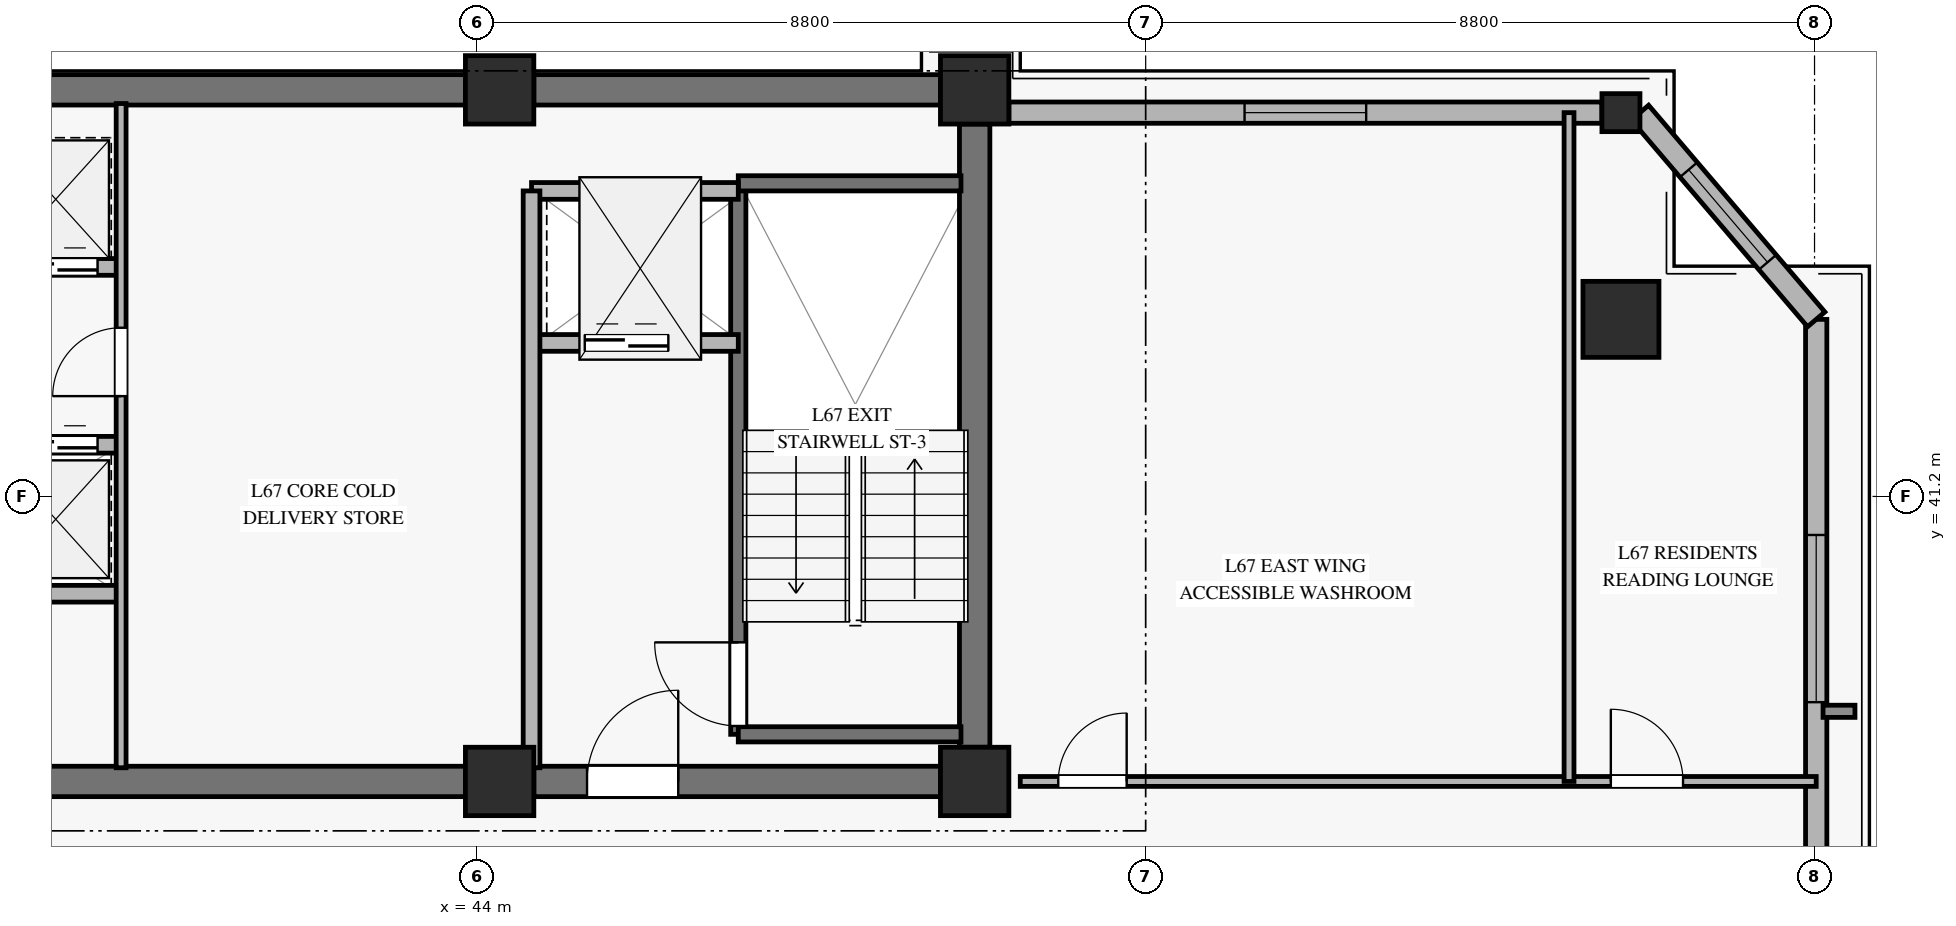
"""IFC4 building model, lengths in metres.
Left out: names, types, materials, properties, quantities, classifications, styles, units other than length and angle.
Written with IfcOpenShell. Run it as: python <this file> out.ifc"""

import sys

from ifc_helpers import new_model, si_unit, direction, frame, frame_2d, origin, origin_2d, place, context, subcontext, project, spatial, rectangle, hollow_rectangle, extrude, source, transform, mapped, element, fill, save


model = new_model("IFC4")
c1 = context("Model", 3, precision=1e-05, world=origin(), true_north=direction((0.0, 1.0)))
c2 = subcontext(c1, "Body", "Model", "MODEL_VIEW")
j1 = project(units=[si_unit("LENGTHUNIT", "METRE"), si_unit("PLANEANGLEUNIT", "RADIAN")], contexts=[c1])
p1 = place(None, origin())
s1 = spatial("IfcSite", under=j1, at=p1, CompositionType="ELEMENT")
p2 = place(p1, origin())
s2 = spatial("IfcBuilding", under=s1, at=p2, CompositionType="ELEMENT")
p3 = place(p2, frame((0.0, 0.0, 262.1)))
s3 = spatial("IfcBuildingStorey", under=s2, at=p3, CompositionType="ELEMENT", Elevation=262.1)
m1 = source(origin(), c2, "Body", "SweptSolid", [
    extrude(rectangle(XDim=0.9, YDim=0.9, at=origin_2d()), origin(), (0.0, 0.0, 1.0), 3.185),
])
for number, where, z_axis, x_axis in (
    (1, (44.3, 37.45, 0.0), (0.0, 0.0, 1.0), (1.0, 0.0, 0.0)),
    (2, (44.3, 46.55, 0.0), (0.0, 0.0, 1.0), (1.0, 0.0, 0.0)),
    (3, (50.55, 37.45, 0.0), (0.0, 0.0, 1.0), (1.0, 0.0, 0.0)),
    (4, (50.55, 46.55, 0.0), (0.0, 0.0, 1.0), (1.0, 0.0, 0.0)),
):
    element("IfcColumn", number, at=place(p3, frame(where, z_axis=z_axis, x_axis=x_axis)), inside=s3, PredefinedType="PILASTER", context=c2, shape_type="MappedRepresentation", body=[
        mapped(m1, transform((0.0, 0.0, 0.0), x_axis=(1.0, 0.0, 0.0), y_axis=(0.0, 1.0, 0.0), z_axis=(0.0, 0.0, 1.0), scale=1.0)),
    ])
p4 = place(p3, frame((36.05, 46.55, 0.0), z_axis=(0.0, 0.0, 1.0), x_axis=(1.0, 0.0, 0.0)))
e5 = element("IfcWall", 5, at=p4, inside=s3, PredefinedType="SHEAR", context=c2, shape_type="SweptSolid", body=[
    extrude(rectangle(XDim=7.8, YDim=0.4, at=frame_2d((3.9, 0.0))), origin(), (0.0, 0.0, 1.0), 3.185),
])
p5 = place(p3, frame((44.75, 46.55, 0.0), z_axis=(0.0, 0.0, 1.0), x_axis=(1.0, 0.0, 0.0)))
e6 = element("IfcWall", 6, at=p5, inside=s3, PredefinedType="SHEAR", context=c2, shape_type="SweptSolid", body=[
    extrude(rectangle(XDim=5.35, YDim=0.4, at=frame_2d((2.675, 0.0))), origin(), (0.0, 0.0, 1.0), 3.185),
])
p6 = place(p3, frame((36.05, 37.45, 0.0), z_axis=(0.0, 0.0, 1.0), x_axis=(1.0, 0.0, 0.0)))
e7 = element("IfcWall", 7, at=p6, inside=s3, PredefinedType="SHEAR", context=c2, shape_type="SweptSolid", body=[
    extrude(rectangle(XDim=7.8, YDim=0.4, at=frame_2d((3.9, 0.0))), origin(), (0.0, 0.0, 1.0), 3.185),
])
p7 = place(p3, frame((44.75, 37.45, 0.0), z_axis=(0.0, 0.0, 1.0), x_axis=(1.0, 0.0, 0.0)))
e8 = element("IfcWall", 8, at=p7, inside=s3, PredefinedType="SHEAR", context=c2, shape_type="SweptSolid", body=[
    extrude(rectangle(XDim=5.35, YDim=0.4, at=frame_2d((2.675, 0.0))), origin(), (0.0, 0.0, 1.0), 3.185),
])
p8 = place(p7, frame((0.7, 0.0, 0.0)))
e9 = element("IfcOpeningElement", 9, at=p8, cuts=e8, PredefinedType="OPENING", context=c2, shape_type="SweptSolid", body=[
    extrude(rectangle(XDim=1.2, YDim=2.15, at=frame_2d((0.6, 1.075))), frame((0.0, 0.21, 0.0), z_axis=(0.0, -1.0, 0.0), x_axis=(1.0, 0.0, 0.0)), (0.0, 0.0, 1.0), 0.42),
])
p9 = place(p3, frame((50.55, 37.9, 0.0), z_axis=(0.0, 0.0, 1.0), x_axis=(0.0, 1.0, 0.0)))
e10 = element("IfcWall", 10, at=p9, inside=s3, PredefinedType="SHEAR", context=c2, shape_type="SweptSolid", body=[
    extrude(rectangle(XDim=8.2, YDim=0.4, at=frame_2d((4.1, 0.0))), origin(), (0.0, 0.0, 1.0), 3.185),
])
m2 = source(origin(), c2, "Body", "SweptSolid", [
    extrude(hollow_rectangle(XDim=1.0, YDim=1.0, WallThickness=0.045, at=origin_2d()), origin(), (0.0, 0.0, 1.0), 3.185),
])
p10 = place(p3, frame((59.053, 43.53, 0.0), z_axis=(0.0, 0.0, 1.0), x_axis=(1.0, 0.0, 0.0)))
e11 = element("IfcColumn", 11, at=p10, inside=s3, PredefinedType="COLUMN", context=c2, shape_type="MappedRepresentation", body=[
    mapped(m2, transform((0.0, 0.0, 0.0), x_axis=(1.0, 0.0, 0.0), y_axis=(0.0, 1.0, 0.0), z_axis=(0.0, 0.0, 1.0), scale=1.0)),
])
m3 = source(origin(), c2, "Body", "SweptSolid", [
    extrude(hollow_rectangle(XDim=0.5, YDim=0.5, WallThickness=0.024, at=origin_2d()), origin(), (0.0, 0.0, 1.0), 3.185),
])
p11 = place(p3, frame((59.053, 46.25, 0.0), z_axis=(0.0, 0.0, 1.0), x_axis=(1.0, 0.0, 0.0)))
e12 = element("IfcColumn", 12, at=p11, inside=s3, PredefinedType="COLUMN", context=c2, shape_type="MappedRepresentation", body=[
    mapped(m3, transform((0.0, 0.0, 0.0), x_axis=(1.0, 0.0, 0.0), y_axis=(0.0, 1.0, 0.0), z_axis=(0.0, 0.0, 1.0), scale=1.0)),
])
p12 = place(p3, frame((61.622, 31.322, 0.0), z_axis=(0.0, 0.0, 1.0), x_axis=(0.0, 1.0, 0.0)))
e13 = element("IfcWall", 13, at=p12, inside=s3, PredefinedType="SOLIDWALL", context=c2, shape_type="SweptSolid", body=[
    extrude(rectangle(XDim=12.208, YDim=0.28, at=frame_2d((6.104, 0.0))), origin(), (0.0, 0.0, 1.0), 2.815),
])
p13 = place(p12, frame((7.171, 0.0, 0.45)))
e14 = element("IfcOpeningElement", 14, at=p13, cuts=e13, PredefinedType="OPENING", context=c2, shape_type="SweptSolid", body=[
    extrude(rectangle(XDim=2.2, YDim=2.1, at=frame_2d((1.1, 1.05))), frame((0.0, 0.15, 0.0), z_axis=(0.0, -1.0, 0.0), x_axis=(1.0, 0.0, 0.0)), (0.0, 0.0, 1.0), 0.3),
])
p14 = place(p3, frame((51.0, 46.25, 0.0), z_axis=(0.0, 0.0, 1.0), x_axis=(1.0, 0.0, 0.0)))
e15 = element("IfcWall", 15, at=p14, inside=s3, PredefinedType="SOLIDWALL", context=c2, shape_type="SweptSolid", body=[
    extrude(rectangle(XDim=7.803, YDim=0.28, at=frame_2d((3.901, 0.0))), origin(), (0.0, 0.0, 1.0), 2.815),
])
p15 = place(p14, frame((3.101, 0.0, 0.45)))
e16 = element("IfcOpeningElement", 16, at=p15, cuts=e15, PredefinedType="OPENING", context=c2, shape_type="SweptSolid", body=[
    extrude(rectangle(XDim=1.6, YDim=2.0, at=frame_2d((0.8, 1.0))), frame((0.0, 0.15, 0.0), z_axis=(0.0, -1.0, 0.0), x_axis=(1.0, 0.0, 0.0)), (0.0, 0.0, 1.0), 0.3),
])
p16 = place(p3, frame((61.622, 43.53, 0.0), z_axis=(0.0, 0.0, 1.0), x_axis=(-0.648803559951, 0.760955938669, 0.0)))
e17 = element("IfcWall", 17, at=p16, inside=s3, PredefinedType="SOLIDWALL", context=c2, shape_type="SweptSolid", body=[
    extrude(rectangle(XDim=3.574, YDim=0.3, at=frame_2d((1.787, 0.0))), origin(), (0.0, 0.0, 1.0), 2.815),
])
p17 = place(p16, frame((0.987, 0.0, 0.45)))
e18 = element("IfcOpeningElement", 18, at=p17, cuts=e17, PredefinedType="OPENING", context=c2, shape_type="SweptSolid", body=[
    extrude(rectangle(XDim=1.6, YDim=2.0, at=frame_2d((0.8, 1.0))), frame((0.0, 0.16, 0.0), z_axis=(0.0, -1.0, 0.0), x_axis=(1.0, 0.0, 0.0)), (0.0, 0.0, 1.0), 0.32),
])
p18 = place(p3, frame((47.44, 38.07, 0.0), z_axis=(0.0, 0.0, 1.0), x_axis=(0.0, 1.0, 0.0)))
e19 = element("IfcWall", 19, at=p18, inside=s3, PredefinedType="SOLIDWALL", context=c2, shape_type="SweptSolid", body=[
    extrude(rectangle(XDim=7.25, YDim=0.2, at=frame_2d((3.625, 0.0))), origin(), (0.0, 0.0, 1.0), 3.4),
])
p19 = place(p18, frame((0.11, 0.0, 0.0)))
e20 = element("IfcOpeningElement", 20, at=p19, cuts=e19, PredefinedType="OPENING", context=c2, shape_type="SweptSolid", body=[
    extrude(rectangle(XDim=1.1, YDim=2.15, at=frame_2d((0.55, 1.075))), frame((0.0, 0.11, 0.0), z_axis=(0.0, -1.0, 0.0), x_axis=(1.0, 0.0, 0.0)), (0.0, 0.0, 1.0), 0.22),
])
for number, where, z_axis, x_axis in (
    (21, (47.44, 45.32, 0.0), (0.0, 0.0, 1.0), (1.0, 0.0, 0.0)),
    (22, (47.44, 38.07, 0.0), (0.0, 0.0, 1.0), (1.0, 0.0, 0.0)),
):
    element("IfcWall", number, at=place(p3, frame(where, z_axis=z_axis, x_axis=x_axis)), inside=s3, PredefinedType="SOLIDWALL", context=c2, shape_type="SweptSolid", body=[
        extrude(rectangle(XDim=2.93, YDim=0.2, at=frame_2d((1.465, 0.0))), origin(), (0.0, 0.0, 1.0), 3.4),
    ])
p20 = place(p3, frame((44.72, 43.22, 0.0), z_axis=(0.0, 0.0, 1.0), x_axis=(1.0, 0.0, 0.0)))
e23 = element("IfcWall", 23, at=p20, inside=s3, PredefinedType="SOLIDWALL", context=c2, shape_type="SweptSolid", body=[
    extrude(rectangle(XDim=2.72, YDim=0.22, at=frame_2d((1.36, 0.0))), origin(), (0.0, 0.0, 1.0), 3.185),
])
p21 = place(p20, frame((0.7, 0.0, 0.0)))
e24 = element("IfcOpeningElement", 24, at=p21, cuts=e23, PredefinedType="OPENING", context=c2, shape_type="SweptSolid", body=[
    extrude(rectangle(XDim=1.1, YDim=2.2, at=frame_2d((0.55, 1.1))), frame((0.0, 0.12, 0.0), z_axis=(0.0, -1.0, 0.0), x_axis=(1.0, 0.0, 0.0)), (0.0, 0.0, 1.0), 0.24),
])
p22 = place(p3, frame((44.72, 45.22, 0.0), z_axis=(0.0, 0.0, 1.0), x_axis=(1.0, 0.0, 0.0)))
e25 = element("IfcWall", 25, at=p22, inside=s3, PredefinedType="SOLIDWALL", context=c2, shape_type="SweptSolid", body=[
    extrude(rectangle(XDim=2.72, YDim=0.22, at=frame_2d((1.36, 0.0))), origin(), (0.0, 0.0, 1.0), 3.185),
])
p23 = place(p3, frame((44.72, 37.63, 0.0), z_axis=(0.0, 0.0, 1.0), x_axis=(0.0, 1.0, 0.0)))
e26 = element("IfcWall", 26, at=p23, inside=s3, PredefinedType="SOLIDWALL", context=c2, shape_type="SweptSolid", body=[
    extrude(rectangle(XDim=7.59, YDim=0.22, at=frame_2d((3.795, 0.0))), origin(), (0.0, 0.0, 1.0), 3.185),
])
p24 = place(p3, frame((36.12, 44.22, 0.0), z_axis=(0.0, 0.0, 1.0), x_axis=(1.0, 0.0, 0.0)))
e27 = element("IfcWall", 27, at=p24, inside=s3, PredefinedType="SOLIDWALL", context=c2, shape_type="SweptSolid", body=[
    extrude(rectangle(XDim=3.2, YDim=0.22, at=frame_2d((1.6, 0.0))), origin(), (0.0, 0.0, 1.0), 3.185),
])
p25 = place(p24, frame((0.3, 0.0, 0.0)))
e28 = element("IfcOpeningElement", 28, at=p25, cuts=e27, PredefinedType="OPENING", context=c2, shape_type="SweptSolid", body=[
    extrude(rectangle(XDim=1.1, YDim=2.2, at=frame_2d((0.55, 1.1))), frame((0.0, 0.12, 0.0), z_axis=(0.0, -1.0, 0.0), x_axis=(1.0, 0.0, 0.0)), (0.0, 0.0, 1.0), 0.24),
])
p26 = place(p24, frame((1.79, 0.0, 0.0)))
e29 = element("IfcOpeningElement", 29, at=p26, cuts=e27, PredefinedType="OPENING", context=c2, shape_type="SweptSolid", body=[
    extrude(rectangle(XDim=1.1, YDim=2.2, at=frame_2d((0.55, 1.1))), frame((0.0, 0.12, 0.0), z_axis=(0.0, -1.0, 0.0), x_axis=(1.0, 0.0, 0.0)), (0.0, 0.0, 1.0), 0.24),
])
p27 = place(p3, frame((36.12, 41.88, 0.0), z_axis=(0.0, 0.0, 1.0), x_axis=(1.0, 0.0, 0.0)))
e30 = element("IfcWall", 30, at=p27, inside=s3, PredefinedType="SOLIDWALL", context=c2, shape_type="SweptSolid", body=[
    extrude(rectangle(XDim=3.2, YDim=0.22, at=frame_2d((1.6, 0.0))), origin(), (0.0, 0.0, 1.0), 3.185),
])
p28 = place(p27, frame((0.3, 0.0, 0.0)))
e31 = element("IfcOpeningElement", 31, at=p28, cuts=e30, PredefinedType="OPENING", context=c2, shape_type="SweptSolid", body=[
    extrude(rectangle(XDim=1.1, YDim=2.2, at=frame_2d((0.55, 1.1))), frame((0.0, 0.12, 0.0), z_axis=(0.0, -1.0, 0.0), x_axis=(1.0, 0.0, 0.0)), (0.0, 0.0, 1.0), 0.24),
])
p29 = place(p27, frame((1.79, 0.0, 0.0)))
e32 = element("IfcOpeningElement", 32, at=p29, cuts=e30, PredefinedType="OPENING", context=c2, shape_type="SweptSolid", body=[
    extrude(rectangle(XDim=1.1, YDim=2.2, at=frame_2d((0.55, 1.1))), frame((0.0, 0.12, 0.0), z_axis=(0.0, -1.0, 0.0), x_axis=(1.0, 0.0, 0.0)), (0.0, 0.0, 1.0), 0.24),
])
p30 = place(p3, frame((36.12, 39.92, 0.0), z_axis=(0.0, 0.0, 1.0), x_axis=(1.0, 0.0, 0.0)))
e33 = element("IfcWall", 33, at=p30, inside=s3, PredefinedType="SOLIDWALL", context=c2, shape_type="SweptSolid", body=[
    extrude(rectangle(XDim=3.2, YDim=0.22, at=frame_2d((1.6, 0.0))), origin(), (0.0, 0.0, 1.0), 3.185),
])
p31 = place(p3, frame((39.32, 37.63, 0.0), z_axis=(0.0, 0.0, 1.0), x_axis=(0.0, 1.0, 0.0)))
e34 = element("IfcWall", 34, at=p31, inside=s3, PredefinedType="PARTITIONING", context=c2, shape_type="SweptSolid", body=[
    extrude(rectangle(XDim=8.74, YDim=0.13, at=frame_2d((4.37, 0.0))), origin(), (0.0, 0.0, 1.0), 3.185),
])
p32 = place(p31, frame((4.89, 0.0, 0.0)))
e35 = element("IfcOpeningElement", 35, at=p32, cuts=e34, PredefinedType="OPENING", context=c2, shape_type="SweptSolid", body=[
    extrude(rectangle(XDim=0.9, YDim=2.1, at=frame_2d((0.45, 1.05))), frame((0.0, 0.075, 0.0), z_axis=(0.0, -1.0, 0.0), x_axis=(1.0, 0.0, 0.0)), (0.0, 0.0, 1.0), 0.15),
])
p33 = place(p3, frame((51.15, 37.45, 0.0), z_axis=(0.0, 0.0, 1.0), x_axis=(1.0, 0.0, 0.0)))
e36 = element("IfcWall", 36, at=p33, inside=s3, PredefinedType="PARTITIONING", context=c2, shape_type="SweptSolid", body=[
    extrude(rectangle(XDim=10.472, YDim=0.13, at=frame_2d((5.236, 0.0))), origin(), (0.0, 0.0, 1.0), 2.82),
])
p34 = place(p33, frame((0.5, 0.0, 0.0)))
e37 = element("IfcOpeningElement", 37, at=p34, cuts=e36, PredefinedType="OPENING", context=c2, shape_type="SweptSolid", body=[
    extrude(rectangle(XDim=0.9, YDim=2.1, at=frame_2d((0.45, 1.05))), frame((0.0, 0.075, 0.0), z_axis=(0.0, -1.0, 0.0), x_axis=(1.0, 0.0, 0.0)), (0.0, 0.0, 1.0), 0.15),
])
p35 = place(p33, frame((7.77, 0.0, 0.0)))
e38 = element("IfcOpeningElement", 38, at=p35, cuts=e36, PredefinedType="OPENING", context=c2, shape_type="SweptSolid", body=[
    extrude(rectangle(XDim=0.95, YDim=2.1, at=frame_2d((0.475, 1.05))), frame((0.0, 0.075, 0.0), z_axis=(0.0, -1.0, 0.0), x_axis=(1.0, 0.0, 0.0)), (0.0, 0.0, 1.0), 0.15),
])
p36 = place(p3, frame((58.37, 37.45, 0.0), z_axis=(0.0, 0.0, 1.0), x_axis=(0.0, 1.0, 0.0)))
e39 = element("IfcWall", 39, at=p36, inside=s3, PredefinedType="PARTITIONING", context=c2, shape_type="SweptSolid", body=[
    extrude(rectangle(XDim=8.8, YDim=0.13, at=frame_2d((4.4, 0.0))), origin(), (0.0, 0.0, 1.0), 3.185),
])
m4 = source(origin(), c2, "Body", "SweptSolid", [
    extrude(rectangle(XDim=2.2, YDim=2.1, at=frame_2d((1.1, 1.05))), frame((0.0, 0.03, 0.0), z_axis=(0.0, -1.0, 0.0), x_axis=(1.0, 0.0, 0.0)), (0.0, 0.0, 1.0), 0.06),
])
p37 = place(p13, origin())
e40 = element("IfcWindow", 40, at=p37, inside=s3, PartitioningType="SINGLE_PANEL", PredefinedType="WINDOW", context=c2, shape_type="MappedRepresentation", body=[
    mapped(m4, transform((0.0, 0.0, 0.0), x_axis=(1.0, 0.0, 0.0), y_axis=(0.0, 1.0, 0.0), z_axis=(0.0, 0.0, 1.0), scale=1.0)),
])
fill(e14, e40)
m5 = source(origin(), c2, "Body", "SweptSolid", [
    extrude(rectangle(XDim=1.6, YDim=2.0, at=frame_2d((0.8, 1.0))), frame((0.0, 0.03, 0.0), z_axis=(0.0, -1.0, 0.0), x_axis=(1.0, 0.0, 0.0)), (0.0, 0.0, 1.0), 0.06),
])
p38 = place(p15, origin())
e41 = element("IfcWindow", 41, at=p38, inside=s3, PartitioningType="SINGLE_PANEL", PredefinedType="WINDOW", context=c2, shape_type="MappedRepresentation", body=[
    mapped(m5, transform((0.0, 0.0, 0.0), x_axis=(1.0, 0.0, 0.0), y_axis=(0.0, 1.0, 0.0), z_axis=(0.0, 0.0, 1.0), scale=1.0)),
])
fill(e16, e41)
p39 = place(p17, origin())
e42 = element("IfcWindow", 42, at=p39, inside=s3, PartitioningType="SINGLE_PANEL", PredefinedType="WINDOW", context=c2, shape_type="MappedRepresentation", body=[
    mapped(m5, transform((0.0, 0.0, 0.0), x_axis=(1.0, 0.0, 0.0), y_axis=(0.0, 1.0, 0.0), z_axis=(0.0, 0.0, 1.0), scale=1.0)),
])
fill(e18, e42)
m6 = source(origin(), c2, "Body", "SweptSolid", [
    extrude(rectangle(XDim=1.1, YDim=2.15, at=frame_2d((0.55, 1.075))), frame((0.0, 0.025, 0.0), z_axis=(0.0, -1.0, 0.0), x_axis=(1.0, 0.0, 0.0)), (0.0, 0.0, 1.0), 0.05),
])
p40 = place(p19, origin())
e43 = element("IfcDoor", 43, at=p40, inside=s3, OperationType="SINGLE_SWING_RIGHT", PredefinedType="DOOR", context=c2, shape_type="MappedRepresentation", body=[
    mapped(m6, transform((0.0, 0.0, 0.0), x_axis=(1.0, 0.0, 0.0), y_axis=(0.0, 1.0, 0.0), z_axis=(0.0, 0.0, 1.0), scale=1.0)),
])
fill(e20, e43)
m7 = source(origin(), c2, "Body", "SweptSolid", [
    extrude(rectangle(XDim=1.1, YDim=2.2, at=frame_2d((0.55, 1.1))), frame((0.0, 0.025, 0.0), z_axis=(0.0, -1.0, 0.0), x_axis=(1.0, 0.0, 0.0)), (0.0, 0.0, 1.0), 0.05),
])
p41 = place(p21, origin())
e44 = element("IfcDoor", 44, at=p41, inside=s3, OperationType="SLIDING_TO_LEFT", PredefinedType="DOOR", context=c2, shape_type="MappedRepresentation", body=[
    mapped(m7, transform((0.0, 0.0, 0.0), x_axis=(1.0, 0.0, 0.0), y_axis=(0.0, 1.0, 0.0), z_axis=(0.0, 0.0, 1.0), scale=1.0)),
])
fill(e24, e44)
m8 = source(origin(), c2, "Body", "SweptSolid", [
    extrude(rectangle(XDim=1.2, YDim=2.15, at=frame_2d((0.6, 1.075))), frame((0.0, 0.025, 0.0), z_axis=(0.0, -1.0, 0.0), x_axis=(1.0, 0.0, 0.0)), (0.0, 0.0, 1.0), 0.05),
])
p42 = place(p8, origin())
e45 = element("IfcDoor", 45, at=p42, inside=s3, OperationType="SINGLE_SWING_RIGHT", PredefinedType="DOOR", context=c2, shape_type="MappedRepresentation", body=[
    mapped(m8, transform((0.0, 0.0, 0.0), x_axis=(1.0, 0.0, 0.0), y_axis=(0.0, 1.0, 0.0), z_axis=(0.0, 0.0, 1.0), scale=1.0)),
])
fill(e9, e45)
p43 = place(p26, origin())
e46 = element("IfcDoor", 46, at=p43, inside=s3, OperationType="SLIDING_TO_LEFT", PredefinedType="DOOR", context=c2, shape_type="MappedRepresentation", body=[
    mapped(m7, transform((0.0, 0.0, 0.0), x_axis=(1.0, 0.0, 0.0), y_axis=(0.0, 1.0, 0.0), z_axis=(0.0, 0.0, 1.0), scale=1.0)),
])
fill(e29, e46)
p44 = place(p29, origin())
e47 = element("IfcDoor", 47, at=p44, inside=s3, OperationType="SLIDING_TO_LEFT", PredefinedType="DOOR", context=c2, shape_type="MappedRepresentation", body=[
    mapped(m7, transform((0.0, 0.0, 0.0), x_axis=(1.0, 0.0, 0.0), y_axis=(0.0, 1.0, 0.0), z_axis=(0.0, 0.0, 1.0), scale=1.0)),
])
fill(e32, e47)
m9 = source(origin(), c2, "Body", "SweptSolid", [
    extrude(rectangle(XDim=0.9, YDim=2.1, at=frame_2d((0.45, 1.05))), frame((0.0, 0.025, 0.0), z_axis=(0.0, -1.0, 0.0), x_axis=(1.0, 0.0, 0.0)), (0.0, 0.0, 1.0), 0.05),
])
p45 = place(p32, origin())
e48 = element("IfcDoor", 48, at=p45, inside=s3, OperationType="SINGLE_SWING_LEFT", PredefinedType="DOOR", context=c2, shape_type="MappedRepresentation", body=[
    mapped(m9, transform((0.0, 0.0, 0.0), x_axis=(1.0, 0.0, 0.0), y_axis=(0.0, 1.0, 0.0), z_axis=(0.0, 0.0, 1.0), scale=1.0)),
])
fill(e35, e48)
p46 = place(p34, origin())
e49 = element("IfcDoor", 49, at=p46, inside=s3, OperationType="SINGLE_SWING_RIGHT", PredefinedType="DOOR", context=c2, shape_type="MappedRepresentation", body=[
    mapped(m9, transform((0.0, 0.0, 0.0), x_axis=(1.0, 0.0, 0.0), y_axis=(0.0, 1.0, 0.0), z_axis=(0.0, 0.0, 1.0), scale=1.0)),
])
fill(e37, e49)
m10 = source(origin(), c2, "Body", "SweptSolid", [
    extrude(rectangle(XDim=0.95, YDim=2.1, at=frame_2d((0.475, 1.05))), frame((0.0, 0.025, 0.0), z_axis=(0.0, -1.0, 0.0), x_axis=(1.0, 0.0, 0.0)), (0.0, 0.0, 1.0), 0.05),
])
p47 = place(p35, origin())
e50 = element("IfcDoor", 50, at=p47, inside=s3, OperationType="SINGLE_SWING_LEFT", PredefinedType="DOOR", context=c2, shape_type="MappedRepresentation", body=[
    mapped(m10, transform((0.0, 0.0, 0.0), x_axis=(1.0, 0.0, 0.0), y_axis=(0.0, 1.0, 0.0), z_axis=(0.0, 0.0, 1.0), scale=1.0)),
])
fill(e38, e50)
save(model, sys.argv[1])
